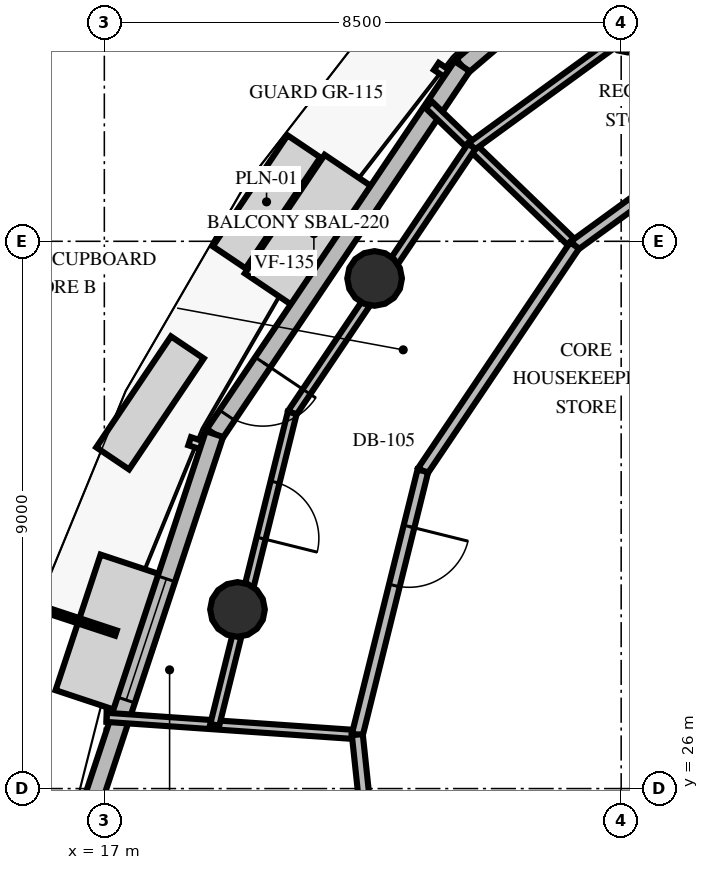
"""IFC4 building model, lengths in metres.
Left out: names, types, materials, properties, quantities, classifications, styles, units other than length and angle.
Written with IfcOpenShell. Run it as: python <this file> out.ifc"""

import sys

from ifc_helpers import new_model, si_unit, direction, frame, frame_2d, origin, origin_2d, place, context, subcontext, project, spatial, rectangle, circle, extrude, element, fill, save


model = new_model("IFC4")
c1 = context("Model", 3, precision=1e-05, world=origin(), true_north=direction((0.0, 1.0)))
c2 = subcontext(c1, "Body", "Model", "MODEL_VIEW")
j1 = project(units=[si_unit("LENGTHUNIT", "METRE"), si_unit("PLANEANGLEUNIT", "RADIAN")], contexts=[c1])
p1 = place(None, origin())
s1 = spatial("IfcSite", under=j1, at=p1, CompositionType="ELEMENT")
p2 = place(p1, origin())
s2 = spatial("IfcBuilding", under=s1, at=p2, CompositionType="ELEMENT")
p3 = place(p2, frame((0.0, 0.0, 262.8)))
s3 = spatial("IfcBuildingStorey", under=s2, at=p3, CompositionType="ELEMENT", Elevation=262.8)
for number, where, z_axis, x_axis in (
    (1, (25.611, 38.555, 0.0), (0.0, 0.0, 1.0), (1.0, 0.0, 0.0)),
    (2, (21.445, 34.389, 0.0), (0.0, 0.0, 1.0), (1.0, 0.0, 0.0)),
    (3, (19.19, 28.946, 0.0), (0.0, 0.0, 1.0), (1.0, 0.0, 0.0)),
):
    element("IfcColumn", number, at=place(p3, frame(where, z_axis=z_axis, x_axis=x_axis)), inside=s3, PredefinedType="COLUMN", context=c2, shape_type="SweptSolid", body=[
        extrude(circle(Radius=0.45, at=origin_2d()), origin(), (0.0, 0.0, 1.0), 3.6),
    ])
p4 = place(p3, frame((28.298, 42.497, 0.0), z_axis=(0.0, 0.0, 1.0), x_axis=(-0.760867335081, -0.648907465211, 0.0)))
e4 = element("IfcWall", 4, at=p4, inside=s3, PredefinedType="SOLIDWALL", context=c2, shape_type="SweptSolid", body=[
    extrude(rectangle(XDim=7.115, YDim=0.3, at=frame_2d((3.558, 0.0))), origin(), (0.0, 0.0, 1.0), 2.76),
])
p5 = place(p4, frame((2.508, 0.0, 0.8)))
e5 = element("IfcOpeningElement", 5, at=p5, cuts=e4, PredefinedType="OPENING", context=c2, shape_type="SweptSolid", body=[
    extrude(rectangle(XDim=2.1, YDim=1.85, at=frame_2d((1.05, 0.925))), frame((0.0, 0.16, 0.0), z_axis=(0.0, -1.0, 0.0), x_axis=(1.0, 0.0, 0.0)), (0.0, 0.0, 1.0), 0.32),
])
p6 = place(p3, frame((22.884, 37.88, 0.0), z_axis=(0.0, 0.0, 1.0), x_axis=(-0.558472062766, -0.829523330057, 0.0)))
e6 = element("IfcWall", 6, at=p6, inside=s3, PredefinedType="SOLIDWALL", context=c2, shape_type="SweptSolid", body=[
    extrude(rectangle(XDim=7.293, YDim=0.3, at=frame_2d((3.646, 0.0))), origin(), (0.0, 0.0, 1.0), 2.76),
])
p7 = place(p6, frame((5.87, 0.0, 0.0)))
e7 = element("IfcOpeningElement", 7, at=p7, cuts=e6, PredefinedType="OPENING", context=c2, shape_type="SweptSolid", body=[
    extrude(rectangle(XDim=1.05, YDim=2.15, at=frame_2d((0.525, 1.075))), frame((0.0, 0.16, 0.0), z_axis=(0.0, -1.0, 0.0), x_axis=(1.0, 0.0, 0.0)), (0.0, 0.0, 1.0), 0.32),
])
p8 = place(p3, frame((18.811, 31.83, 0.0), z_axis=(0.0, 0.0, 1.0), x_axis=(-0.314951068445, -0.949107909821, 0.0)))
e8 = element("IfcWall", 8, at=p8, inside=s3, PredefinedType="SOLIDWALL", context=c2, shape_type="SweptSolid", body=[
    extrude(rectangle(XDim=7.115, YDim=0.3, at=frame_2d((3.558, 0.0))), origin(), (0.0, 0.0, 1.0), 2.76),
])
p9 = place(p8, frame((2.508, 0.0, 0.8)))
e9 = element("IfcOpeningElement", 9, at=p9, cuts=e8, PredefinedType="OPENING", context=c2, shape_type="SweptSolid", body=[
    extrude(rectangle(XDim=2.1, YDim=1.85, at=frame_2d((1.05, 0.925))), frame((0.0, 0.16, 0.0), z_axis=(0.0, -1.0, 0.0), x_axis=(1.0, 0.0, 0.0)), (0.0, 0.0, 1.0), 0.32),
])
p10 = place(p3, frame((24.734, 34.932, 0.0), z_axis=(0.0, 0.0, 1.0), x_axis=(-0.719960692402, 0.694014842345, 0.0)))
e10 = element("IfcWall", 10, at=p10, inside=s3, PredefinedType="PARTITIONING", context=c2, shape_type="SweptSolid", body=[
    extrude(rectangle(XDim=3.331, YDim=0.15, at=frame_2d((1.666, 0.0))), origin(), (0.0, 0.0, 1.0), 2.46),
])
p11 = place(p3, frame((28.348, 37.562, 0.0), z_axis=(0.0, 0.0, 1.0), x_axis=(-0.808504545443, -0.588489931942, 0.0)))
e11 = element("IfcWall", 11, at=p11, inside=s3, PredefinedType="PARTITIONING", context=c2, shape_type="SweptSolid", body=[
    extrude(rectangle(XDim=4.47, YDim=0.18, at=frame_2d((2.235, 0.0))), origin(), (0.0, 0.0, 1.0), 2.46),
])
p12 = place(p3, frame((27.316, 39.674, 0.0), z_axis=(0.0, 0.0, 1.0), x_axis=(-0.808492350613, -0.588506685604, 0.0)))
e12 = element("IfcWall", 12, at=p12, inside=s3, PredefinedType="PARTITIONING", context=c2, shape_type="SweptSolid", body=[
    extrude(rectangle(XDim=5.286, YDim=0.15, at=frame_2d((2.643, 0.0))), origin(), (0.0, 0.0, 1.0), 2.46),
])
p13 = place(p3, frame((21.161, 26.887, 0.0), z_axis=(0.0, 0.0, 1.0), x_axis=(-0.997629768719, 0.068810206849, 0.0)))
e13 = element("IfcWall", 13, at=p13, inside=s3, PredefinedType="PARTITIONING", context=c2, shape_type="SweptSolid", body=[
    extrude(rectangle(XDim=4.13, YDim=0.15, at=frame_2d((2.065, 0.0))), origin(), (0.0, 0.0, 1.0), 2.46),
])
p14 = place(p3, frame((24.734, 34.932, 0.0), z_axis=(0.0, 0.0, 1.0), x_axis=(-0.558488411433, -0.829512323172, 0.0)))
e14 = element("IfcWall", 14, at=p14, inside=s3, PredefinedType="PARTITIONING", context=c2, shape_type="SweptSolid", body=[
    extrude(rectangle(XDim=4.47, YDim=0.18, at=frame_2d((2.235, 0.0))), origin(), (0.0, 0.0, 1.0), 2.46),
])
p15 = place(p3, frame((22.238, 31.224, 0.0), z_axis=(0.0, 0.0, 1.0), x_axis=(-0.241057272798, -0.970510891866, 0.0)))
e15 = element("IfcWall", 15, at=p15, inside=s3, PredefinedType="PARTITIONING", context=c2, shape_type="SweptSolid", body=[
    extrude(rectangle(XDim=4.469, YDim=0.18, at=frame_2d((2.235, 0.0))), origin(), (0.0, 0.0, 1.0), 2.46),
])
p16 = place(p15, frame((0.942, 0.0, 0.0)))
e16 = element("IfcOpeningElement", 16, at=p16, cuts=e15, PredefinedType="OPENING", context=c2, shape_type="SweptSolid", body=[
    extrude(rectangle(XDim=1.0, YDim=2.15, at=frame_2d((0.5, 1.075))), frame((0.0, 0.1, 0.0), z_axis=(0.0, -1.0, 0.0), x_axis=(1.0, 0.0, 0.0)), (0.0, 0.0, 1.0), 0.2),
])
p17 = place(p3, frame((23.042, 36.563, 0.0), z_axis=(0.0, 0.0, 1.0), x_axis=(-0.558510235994, -0.829497628863, 0.0)))
e17 = element("IfcWall", 17, at=p17, inside=s3, PredefinedType="PARTITIONING", context=c2, shape_type="SweptSolid", body=[
    extrude(rectangle(XDim=5.286, YDim=0.15, at=frame_2d((2.643, 0.0))), origin(), (0.0, 0.0, 1.0), 2.46),
])
p18 = place(p3, frame((20.09, 32.178, 0.0), z_axis=(0.0, 0.0, 1.0), x_axis=(-0.241046509173, -0.970513565292, 0.0)))
e18 = element("IfcWall", 18, at=p18, inside=s3, PredefinedType="PARTITIONING", context=c2, shape_type="SweptSolid", body=[
    extrude(rectangle(XDim=5.286, YDim=0.15, at=frame_2d((2.643, 0.0))), origin(), (0.0, 0.0, 1.0), 2.46),
])
p19 = place(p18, frame((1.174, 0.0, 0.0)))
e19 = element("IfcOpeningElement", 19, at=p19, cuts=e18, PredefinedType="OPENING", context=c2, shape_type="SweptSolid", body=[
    extrude(rectangle(XDim=0.95, YDim=2.15, at=frame_2d((0.475, 1.075))), frame((0.0, 0.085, 0.0), z_axis=(0.0, -1.0, 0.0), x_axis=(1.0, 0.0, 0.0)), (0.0, 0.0, 1.0), 0.17),
])
p20 = place(p3, frame((21.161, 26.887, 0.0), z_axis=(0.0, 0.0, 1.0), x_axis=(0.10536430775, -0.994433689419, 0.0)))
e20 = element("IfcWall", 20, at=p20, inside=s3, PredefinedType="PARTITIONING", context=c2, shape_type="SweptSolid", body=[
    extrude(rectangle(XDim=4.47, YDim=0.18, at=frame_2d((2.235, 0.0))), origin(), (0.0, 0.0, 1.0), 2.46),
])
p21 = place(p7, origin())
e21 = element("IfcDoor", 21, at=p21, inside=s3, OperationType="SINGLE_SWING_LEFT", PredefinedType="DOOR", context=c2, shape_type="SweptSolid", body=[
    extrude(rectangle(XDim=1.05, YDim=2.15, at=frame_2d((0.525, 1.075))), frame((0.0, 0.025, 0.0), z_axis=(0.0, -1.0, 0.0), x_axis=(1.0, 0.0, 0.0)), (0.0, 0.0, 1.0), 0.05),
])
fill(e7, e21)
p22 = place(p9, origin())
e22 = element("IfcWindow", 22, at=p22, inside=s3, PartitioningType="SINGLE_PANEL", PredefinedType="WINDOW", context=c2, shape_type="SweptSolid", body=[
    extrude(rectangle(XDim=2.1, YDim=1.85, at=frame_2d((1.05, 0.925))), frame((0.0, 0.03, 0.0), z_axis=(0.0, -1.0, 0.0), x_axis=(1.0, 0.0, 0.0)), (0.0, 0.0, 1.0), 0.06),
])
fill(e9, e22)
p23 = place(p16, origin())
e23 = element("IfcDoor", 23, at=p23, inside=s3, OperationType="SINGLE_SWING_LEFT", PredefinedType="DOOR", context=c2, shape_type="SweptSolid", body=[
    extrude(rectangle(XDim=1.0, YDim=2.15, at=frame_2d((0.5, 1.075))), frame((0.0, 0.025, 0.0), z_axis=(0.0, -1.0, 0.0), x_axis=(1.0, 0.0, 0.0)), (0.0, 0.0, 1.0), 0.05),
])
fill(e16, e23)
p24 = place(p19, origin())
e24 = element("IfcDoor", 24, at=p24, inside=s3, OperationType="SINGLE_SWING_RIGHT", PredefinedType="DOOR", context=c2, shape_type="SweptSolid", body=[
    extrude(rectangle(XDim=0.95, YDim=2.15, at=frame_2d((0.475, 1.075))), frame((0.0, 0.025, 0.0), z_axis=(0.0, -1.0, 0.0), x_axis=(1.0, 0.0, 0.0)), (0.0, 0.0, 1.0), 0.05),
])
fill(e19, e24)
save(model, sys.argv[1])
